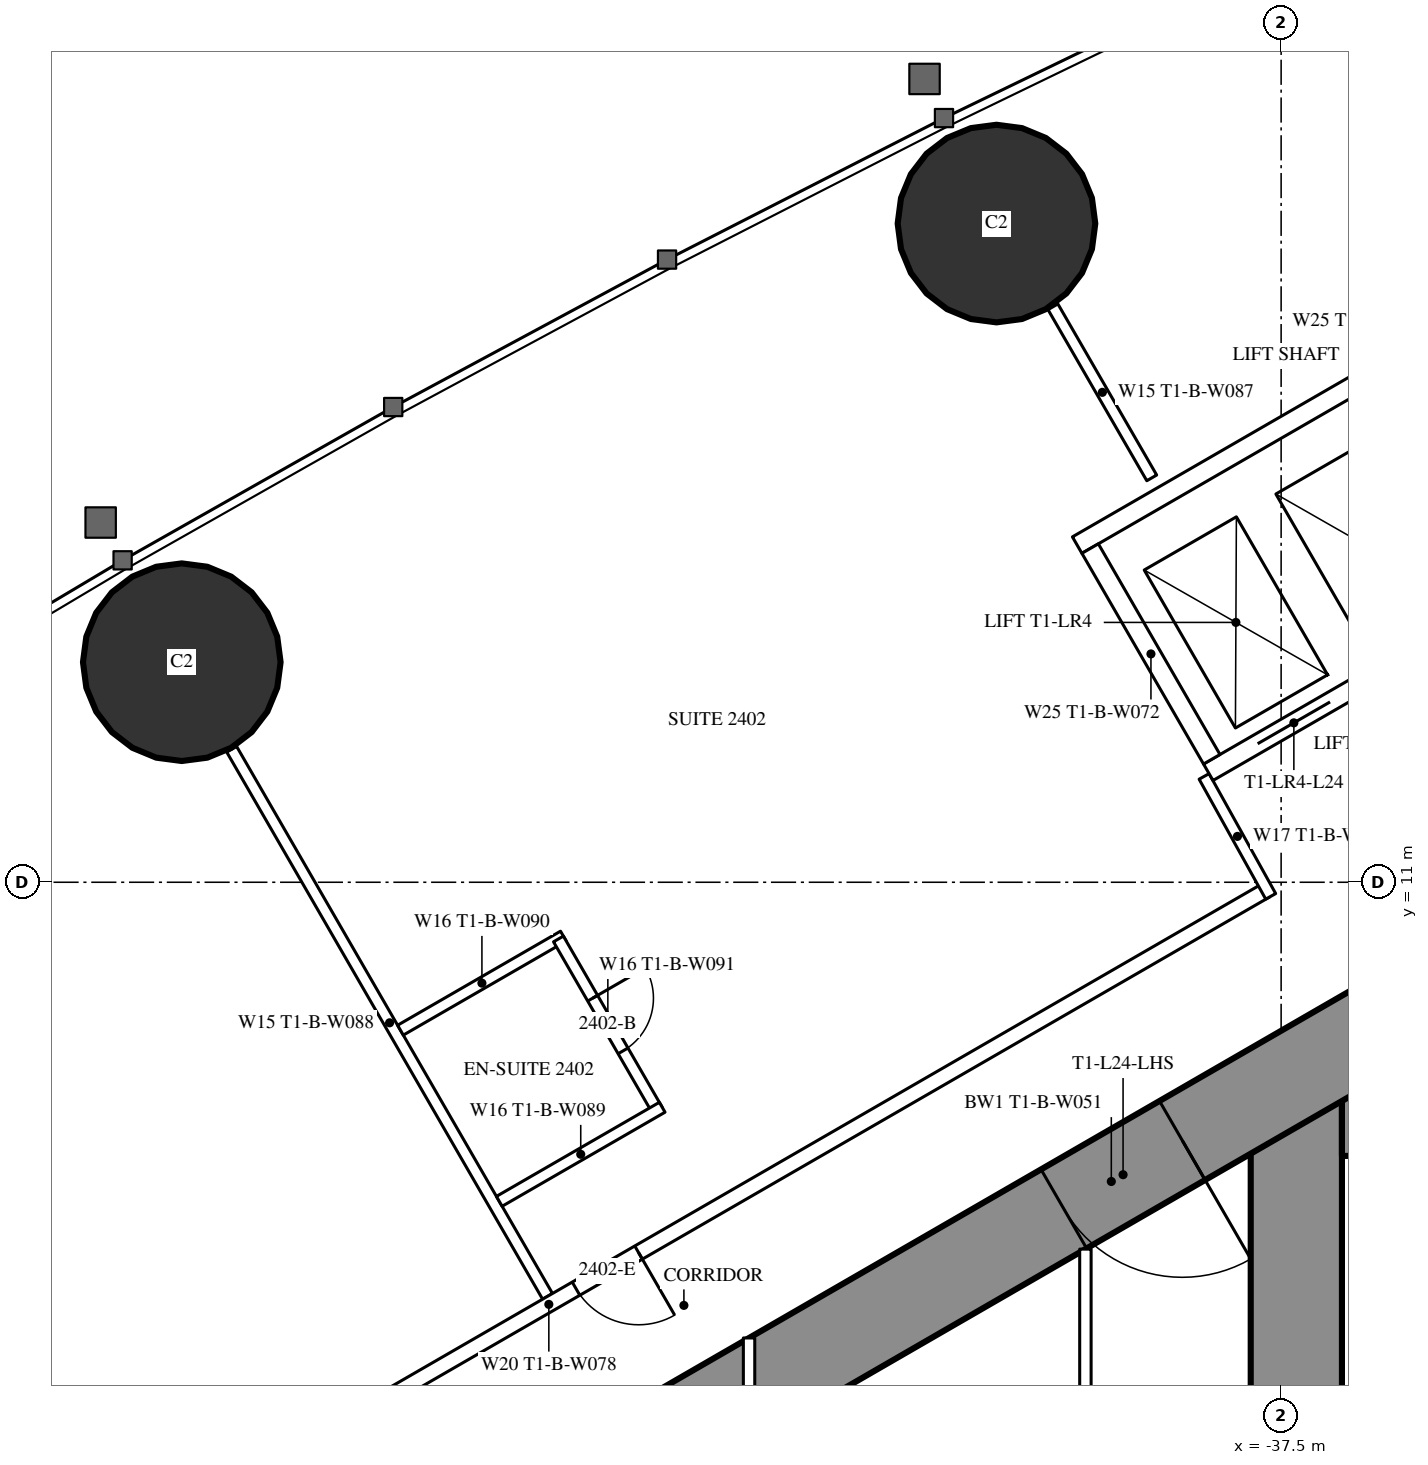
"""IFC4 building model, lengths in metres.
Left out: names, types, materials, properties, quantities, classifications, styles, units other than length and angle.
Written with IfcOpenShell. Run it as: python <this file> out.ifc"""

import sys

from ifc_helpers import new_model, si_unit, direction, frame, frame_2d, origin, origin_2d, place, context, subcontext, project, spatial, rectangle, hollow_circle, extrude, element, fill, save


model = new_model("IFC4")
c1 = context("Model", 3, precision=1e-05, world=origin(), true_north=direction((0.0, 1.0)))
c2 = subcontext(c1, "Body", "Model", "MODEL_VIEW")
j1 = project(units=[si_unit("LENGTHUNIT", "METRE"), si_unit("PLANEANGLEUNIT", "RADIAN")], contexts=[c1])
p1 = place(None, origin())
s1 = spatial("IfcSite", under=j1, at=p1, CompositionType="ELEMENT")
p2 = place(p1, origin())
s2 = spatial("IfcBuilding", under=s1, at=p2, CompositionType="ELEMENT")
p3 = place(p2, frame((0.0, 0.0, 94.1)))
s3 = spatial("IfcBuildingStorey", under=s2, at=p3, CompositionType="ELEMENT", Elevation=94.1)
for number, where, z_axis, x_axis in (
    (1, (-41.245, 19.666, 0.0), (0.0, 0.0, 1.0), (1.0, 0.0, 0.0)),
    (2, (-51.963, 13.895, 0.0), (0.0, 0.0, 1.0), (1.0, 0.0, 0.0)),
):
    element("IfcColumn", number, at=place(p3, frame(where, z_axis=z_axis, x_axis=x_axis)), inside=s3, PredefinedType="COLUMN", context=c2, shape_type="SweptSolid", body=[
        extrude(hollow_circle(Radius=1.3, WallThickness=0.1, at=origin_2d()), origin(), (0.0, 0.0, 1.0), 3.5),
    ])
p4 = place(p3, frame((-37.3, 8.6, 0.0), z_axis=(0.0, 0.0, 1.0), x_axis=(0.0, -1.0, 0.0)))
e3 = element("IfcWall", 3, at=p4, inside=s3, PredefinedType="SHEAR", context=c2, shape_type="SweptSolid", body=[
    extrude(rectangle(XDim=17.2, YDim=1.2, at=frame_2d((8.6, 0.0))), origin(), (0.0, 0.0, 1.0), 3.5),
])
p5 = place(p4, frame((7.7, 0.0, 0.0)))
e4 = element("IfcOpeningElement", 4, at=p5, cuts=e3, PredefinedType="OPENING", context=c2, shape_type="SweptSolid", body=[
    extrude(rectangle(XDim=1.8, YDim=2.2, at=frame_2d((0.9, 1.1))), frame((0.0, 0.61, 0.0), z_axis=(0.0, -1.0, 0.0), x_axis=(1.0, 0.0, 0.0)), (0.0, 0.0, 1.0), 1.22),
])
p6 = place(p3, frame((-28.3, 8.0, 0.0), z_axis=(0.0, 0.0, 1.0), x_axis=(-1.0, 0.0, 0.0)))
e5 = element("IfcWall", 5, at=p6, inside=s3, PredefinedType="SHEAR", context=c2, shape_type="SweptSolid", body=[
    extrude(rectangle(XDim=8.4, YDim=1.2, at=frame_2d((4.2, 0.0))), origin(), (0.0, 0.0, 1.0), 3.5),
])
p7 = place(p6, frame((0.25, 0.0, 0.0)))
e6 = element("IfcOpeningElement", 6, at=p7, cuts=e5, PredefinedType="OPENING", context=c2, shape_type="SweptSolid", body=[
    extrude(rectangle(XDim=1.0, YDim=2.2, at=frame_2d((0.5, 1.1))), frame((0.0, 0.61, 0.0), z_axis=(0.0, -1.0, 0.0), x_axis=(1.0, 0.0, 0.0)), (0.0, 0.0, 1.0), 1.22),
])
p8 = place(p3, frame((-27.2, 14.3, 0.0), z_axis=(0.0, 0.0, 1.0), x_axis=(-0.866026593062, -0.499997940104, 0.0)))
e7 = element("IfcWall", 7, at=p8, inside=s3, PredefinedType="SHEAR", context=c2, shape_type="SweptSolid", body=[
    extrude(rectangle(XDim=28.946, YDim=1.2, at=frame_2d((14.473, 0.0))), origin(), (0.0, 0.0, 1.0), 3.5),
])
p9 = place(p8, frame((4.6, 0.0, 0.0)))
e8 = element("IfcOpeningElement", 8, at=p9, cuts=e7, PredefinedType="OPENING", context=c2, shape_type="SweptSolid", body=[
    extrude(rectangle(XDim=1.0, YDim=2.2, at=frame_2d((0.5, 1.1))), frame((0.0, 0.61, 0.0), z_axis=(0.0, -1.0, 0.0), x_axis=(1.0, 0.0, 0.0)), (0.0, 0.0, 1.0), 1.22),
])
p10 = place(p8, frame((13.395, 0.0, 0.0)))
e9 = element("IfcOpeningElement", 9, at=p10, cuts=e7, PredefinedType="OPENING", context=c2, shape_type="SweptSolid", body=[
    extrude(rectangle(XDim=1.8, YDim=2.2, at=frame_2d((0.9, 1.1))), frame((0.0, 0.61, 0.0), z_axis=(0.0, -1.0, 0.0), x_axis=(1.0, 0.0, 0.0)), (0.0, 0.0, 1.0), 1.22),
])
p11 = place(p3, frame((-47.151, 5.552, 0.0), z_axis=(0.0, 0.0, 1.0), x_axis=(-0.500003012045, 0.866023664773, 0.0)))
e10 = element("IfcWall", 10, at=p11, inside=s3, PredefinedType="PARTITIONING", context=c2, shape_type="SweptSolid", body=[
    extrude(rectangle(XDim=8.311, YDim=0.15, at=frame_2d((4.156, 0.0))), origin(), (0.0, 0.0, 1.0), 2.2),
])
p12 = place(p3, frame((-39.202, 16.32, 0.0), z_axis=(0.0, 0.0, 1.0), x_axis=(-0.499947391036, 0.866055775454, 0.0)))
e11 = element("IfcWall", 11, at=p12, inside=s3, PredefinedType="PARTITIONING", context=c2, shape_type="SweptSolid", body=[
    extrude(rectangle(XDim=2.599, YDim=0.15, at=frame_2d((1.3, 0.0))), origin(), (0.0, 0.0, 1.0), 3.25),
])
p13 = place(p3, frame((-37.7, 10.894, 0.0), z_axis=(0.0, 0.0, 1.0), x_axis=(-0.866027905338, -0.499995667157, 0.0)))
e12 = element("IfcWall", 12, at=p13, inside=s3, PredefinedType="PARTITIONING", context=c2, shape_type="SweptSolid", body=[
    extrude(rectangle(XDim=21.787, YDim=0.2, at=frame_2d((10.894, 0.0))), origin(), (0.0, 0.0, 1.0), 3.25),
])
p14 = place(p13, frame((17.887, 0.0, 0.0)))
e13 = element("IfcOpeningElement", 13, at=p14, cuts=e12, PredefinedType="OPENING", context=c2, shape_type="SweptSolid", body=[
    extrude(rectangle(XDim=0.95, YDim=2.2, at=frame_2d((0.475, 1.1))), frame((0.0, 0.11, 0.0), z_axis=(0.0, -1.0, 0.0), x_axis=(1.0, 0.0, 0.0)), (0.0, 0.0, 1.0), 0.22),
])
p15 = place(p13, frame((9.531, 0.0, 0.0)))
e14 = element("IfcOpeningElement", 14, at=p15, cuts=e12, PredefinedType="OPENING", context=c2, shape_type="SweptSolid", body=[
    extrude(rectangle(XDim=0.95, YDim=2.2, at=frame_2d((0.475, 1.1))), frame((0.0, 0.11, 0.0), z_axis=(0.0, -1.0, 0.0), x_axis=(1.0, 0.0, 0.0)), (0.0, 0.0, 1.0), 0.22),
])
p16 = place(p3, frame((-38.513, 12.392, 0.0), z_axis=(0.0, 0.0, 1.0), x_axis=(0.485585508183, -0.874189175317, 0.0)))
e15 = element("IfcWall", 15, at=p16, inside=s3, PredefinedType="PARTITIONING", context=c2, shape_type="SweptSolid", body=[
    extrude(rectangle(XDim=1.805, YDim=0.15, at=frame_2d((0.902, 0.0))), origin(), (0.0, 0.0, 1.0), 3.25),
])
p17 = place(p3, frame((-46.943, 10.292, 0.0), z_axis=(0.0, 0.0, 1.0), x_axis=(-0.866006523861, -0.500032699561, 0.0)))
e16 = element("IfcWall", 16, at=p17, inside=s3, PredefinedType="PARTITIONING", context=c2, shape_type="SweptSolid", body=[
    extrude(rectangle(XDim=2.475, YDim=0.15, at=frame_2d((1.237, 0.0))), origin(), (0.0, 0.0, 1.0), 3.25),
])
p18 = place(p3, frame((-45.708, 8.002, 0.0), z_axis=(0.0, 0.0, 1.0), x_axis=(-0.500047596559, 0.865997922154, 0.0)))
e17 = element("IfcWall", 17, at=p18, inside=s3, PredefinedType="PARTITIONING", context=c2, shape_type="SweptSolid", body=[
    extrude(rectangle(XDim=2.6, YDim=0.15, at=frame_2d((1.3, 0.0))), origin(), (0.0, 0.0, 1.0), 3.25),
])
p19 = place(p18, frame((0.9, 0.0, 0.0)))
e18 = element("IfcOpeningElement", 18, at=p19, cuts=e17, PredefinedType="OPENING", context=c2, shape_type="SweptSolid", body=[
    extrude(rectangle(XDim=0.8, YDim=2.2, at=frame_2d((0.4, 1.1))), frame((0.0, 0.085, 0.0), z_axis=(0.0, -1.0, 0.0), x_axis=(1.0, 0.0, 0.0)), (0.0, 0.0, 1.0), 0.17),
])
p20 = place(p3, frame((-45.643, 8.04, 0.0), z_axis=(0.0, 0.0, 1.0), x_axis=(-0.866006523861, -0.500032699561, 0.0)))
e19 = element("IfcWall", 19, at=p20, inside=s3, PredefinedType="PARTITIONING", context=c2, shape_type="SweptSolid", body=[
    extrude(rectangle(XDim=2.475, YDim=0.15, at=frame_2d((1.237, 0.0))), origin(), (0.0, 0.0, 1.0), 3.25),
])
p21 = place(p3, frame((-40.075, 6.174, 0.0), z_axis=(0.0, 0.0, 1.0), x_axis=(0.0, -1.0, 0.0)))
e20 = element("IfcWall", 20, at=p21, inside=s3, PredefinedType="PARTITIONING", context=c2, shape_type="SweptSolid", body=[
    extrude(rectangle(XDim=7.374, YDim=0.15, at=frame_2d((3.687, 0.0))), origin(), (0.0, 0.0, 1.0), 3.25),
])
p22 = place(p21, frame((2.787, 0.0, 0.0)))
e21 = element("IfcOpeningElement", 21, at=p22, cuts=e20, PredefinedType="OPENING", context=c2, shape_type="SweptSolid", body=[
    extrude(rectangle(XDim=1.8, YDim=2.2, at=frame_2d((0.9, 1.1))), frame((0.0, 0.085, 0.0), z_axis=(0.0, -1.0, 0.0), x_axis=(1.0, 0.0, 0.0)), (0.0, 0.0, 1.0), 0.17),
])
p23 = place(p3, frame((-44.5, 5.005, 0.0), z_axis=(0.0, 0.0, 1.0), x_axis=(0.0, -1.0, 0.0)))
e22 = element("IfcWall", 22, at=p23, inside=s3, PredefinedType="PARTITIONING", context=c2, shape_type="SweptSolid", body=[
    extrude(rectangle(XDim=10.009, YDim=0.15, at=frame_2d((5.005, 0.0))), origin(), (0.0, 0.0, 1.0), 2.45),
])
p24 = place(p23, frame((2.002, 0.0, 0.0)))
e23 = element("IfcOpeningElement", 23, at=p24, cuts=e22, PredefinedType="OPENING", context=c2, shape_type="SweptSolid", body=[
    extrude(rectangle(XDim=1.0, YDim=2.2, at=frame_2d((0.5, 1.1))), frame((0.0, 0.085, 0.0), z_axis=(0.0, -1.0, 0.0), x_axis=(1.0, 0.0, 0.0)), (0.0, 0.0, 1.0), 0.17),
])
p25 = place(p23, frame((7.007, 0.0, 0.0)))
e24 = element("IfcOpeningElement", 24, at=p25, cuts=e22, PredefinedType="OPENING", context=c2, shape_type="SweptSolid", body=[
    extrude(rectangle(XDim=1.0, YDim=2.2, at=frame_2d((0.5, 1.1))), frame((0.0, 0.085, 0.0), z_axis=(0.0, -1.0, 0.0), x_axis=(1.0, 0.0, 0.0)), (0.0, 0.0, 1.0), 0.17),
])
p26 = place(p3, frame((-31.01, 16.747, 0.0), z_axis=(0.0, 0.0, 1.0), x_axis=(-0.866028165386, -0.499995216735, 0.0)))
e25 = element("IfcWall", 25, at=p26, inside=s3, PredefinedType="PARTITIONING", context=c2, shape_type="SweptSolid", body=[
    extrude(rectangle(XDim=8.6, YDim=0.25, at=frame_2d((4.3, 0.0))), origin(), (0.0, 0.0, 1.0), 3.25),
])
p27 = place(p26, frame((0.75, 0.0, 0.0)))
e26 = element("IfcOpeningElement", 26, at=p27, cuts=e25, PredefinedType="OPENING", context=c2, shape_type="SweptSolid", body=[
    extrude(rectangle(XDim=1.1, YDim=2.2, at=frame_2d((0.55, 1.1))), frame((0.0, 0.135, 0.0), z_axis=(0.0, -1.0, 0.0), x_axis=(1.0, 0.0, 0.0)), (0.0, 0.0, 1.0), 0.27),
])
p28 = place(p26, frame((2.75, 0.0, 0.0)))
e27 = element("IfcOpeningElement", 27, at=p28, cuts=e25, PredefinedType="OPENING", context=c2, shape_type="SweptSolid", body=[
    extrude(rectangle(XDim=1.1, YDim=2.2, at=frame_2d((0.55, 1.1))), frame((0.0, 0.135, 0.0), z_axis=(0.0, -1.0, 0.0), x_axis=(1.0, 0.0, 0.0)), (0.0, 0.0, 1.0), 0.27),
])
p29 = place(p26, frame((4.75, 0.0, 0.0)))
e28 = element("IfcOpeningElement", 28, at=p29, cuts=e25, PredefinedType="OPENING", context=c2, shape_type="SweptSolid", body=[
    extrude(rectangle(XDim=1.1, YDim=2.2, at=frame_2d((0.55, 1.1))), frame((0.0, 0.135, 0.0), z_axis=(0.0, -1.0, 0.0), x_axis=(1.0, 0.0, 0.0)), (0.0, 0.0, 1.0), 0.27),
])
p30 = place(p26, frame((6.75, 0.0, 0.0)))
e29 = element("IfcOpeningElement", 29, at=p30, cuts=e25, PredefinedType="OPENING", context=c2, shape_type="SweptSolid", body=[
    extrude(rectangle(XDim=1.1, YDim=2.2, at=frame_2d((0.55, 1.1))), frame((0.0, 0.135, 0.0), z_axis=(0.0, -1.0, 0.0), x_axis=(1.0, 0.0, 0.0)), (0.0, 0.0, 1.0), 0.27),
])
p31 = place(p3, frame((-32.736, 19.736, 0.0), z_axis=(0.0, 0.0, 1.0), x_axis=(-0.866028165386, -0.499995216735, 0.0)))
e30 = element("IfcWall", 30, at=p31, inside=s3, PredefinedType="PARTITIONING", context=c2, shape_type="SweptSolid", body=[
    extrude(rectangle(XDim=8.6, YDim=0.25, at=frame_2d((4.3, 0.0))), origin(), (0.0, 0.0, 1.0), 3.25),
])
p32 = place(p3, frame((-38.413, 12.618, 0.0), z_axis=(0.0, 0.0, 1.0), x_axis=(-0.499872130319, 0.866099216793, 0.0)))
e31 = element("IfcWall", 31, at=p32, inside=s3, PredefinedType="PARTITIONING", context=c2, shape_type="SweptSolid", body=[
    extrude(rectangle(XDim=3.2, YDim=0.25, at=frame_2d((1.6, 0.0))), origin(), (0.0, 0.0, 1.0), 3.25),
])
p33 = place(p19, origin())
e32 = element("IfcDoor", 32, at=p33, inside=s3, OperationType="SINGLE_SWING_RIGHT", PredefinedType="DOOR", context=c2, shape_type="SweptSolid", body=[
    extrude(rectangle(XDim=0.8, YDim=2.2, at=frame_2d((0.4, 1.1))), frame((0.0, 0.025, 0.0), z_axis=(0.0, -1.0, 0.0), x_axis=(1.0, 0.0, 0.0)), (0.0, 0.0, 1.0), 0.05),
])
fill(e18, e32)
p34 = place(p15, origin())
e33 = element("IfcDoor", 33, at=p34, inside=s3, OperationType="SINGLE_SWING_LEFT", PredefinedType="DOOR", context=c2, shape_type="SweptSolid", body=[
    extrude(rectangle(XDim=0.95, YDim=2.2, at=frame_2d((0.475, 1.1))), frame((0.0, 0.025, 0.0), z_axis=(0.0, -1.0, 0.0), x_axis=(1.0, 0.0, 0.0)), (0.0, 0.0, 1.0), 0.05),
])
fill(e14, e33)
p35 = place(p10, origin())
e34 = element("IfcDoor", 34, at=p35, inside=s3, OperationType="DOUBLE_DOOR_SINGLE_SWING", PredefinedType="DOOR", context=c2, shape_type="SweptSolid", body=[
    extrude(rectangle(XDim=1.8, YDim=2.2, at=frame_2d((0.9, 1.1))), frame((0.0, 0.025, 0.0), z_axis=(0.0, -1.0, 0.0), x_axis=(1.0, 0.0, 0.0)), (0.0, 0.0, 1.0), 0.05),
])
fill(e9, e34)
p36 = place(p30, origin())
e35 = element("IfcDoor", 35, at=p36, inside=s3, OperationType="DOUBLE_DOOR_SLIDING", PredefinedType="USERDEFINED", context=c2, shape_type="SweptSolid", body=[
    extrude(rectangle(XDim=1.1, YDim=2.2, at=frame_2d((0.55, 1.1))), frame((0.0, 0.025, 0.0), z_axis=(0.0, -1.0, 0.0), x_axis=(1.0, 0.0, 0.0)), (0.0, 0.0, 1.0), 0.05),
])
fill(e29, e35)
save(model, sys.argv[1])
